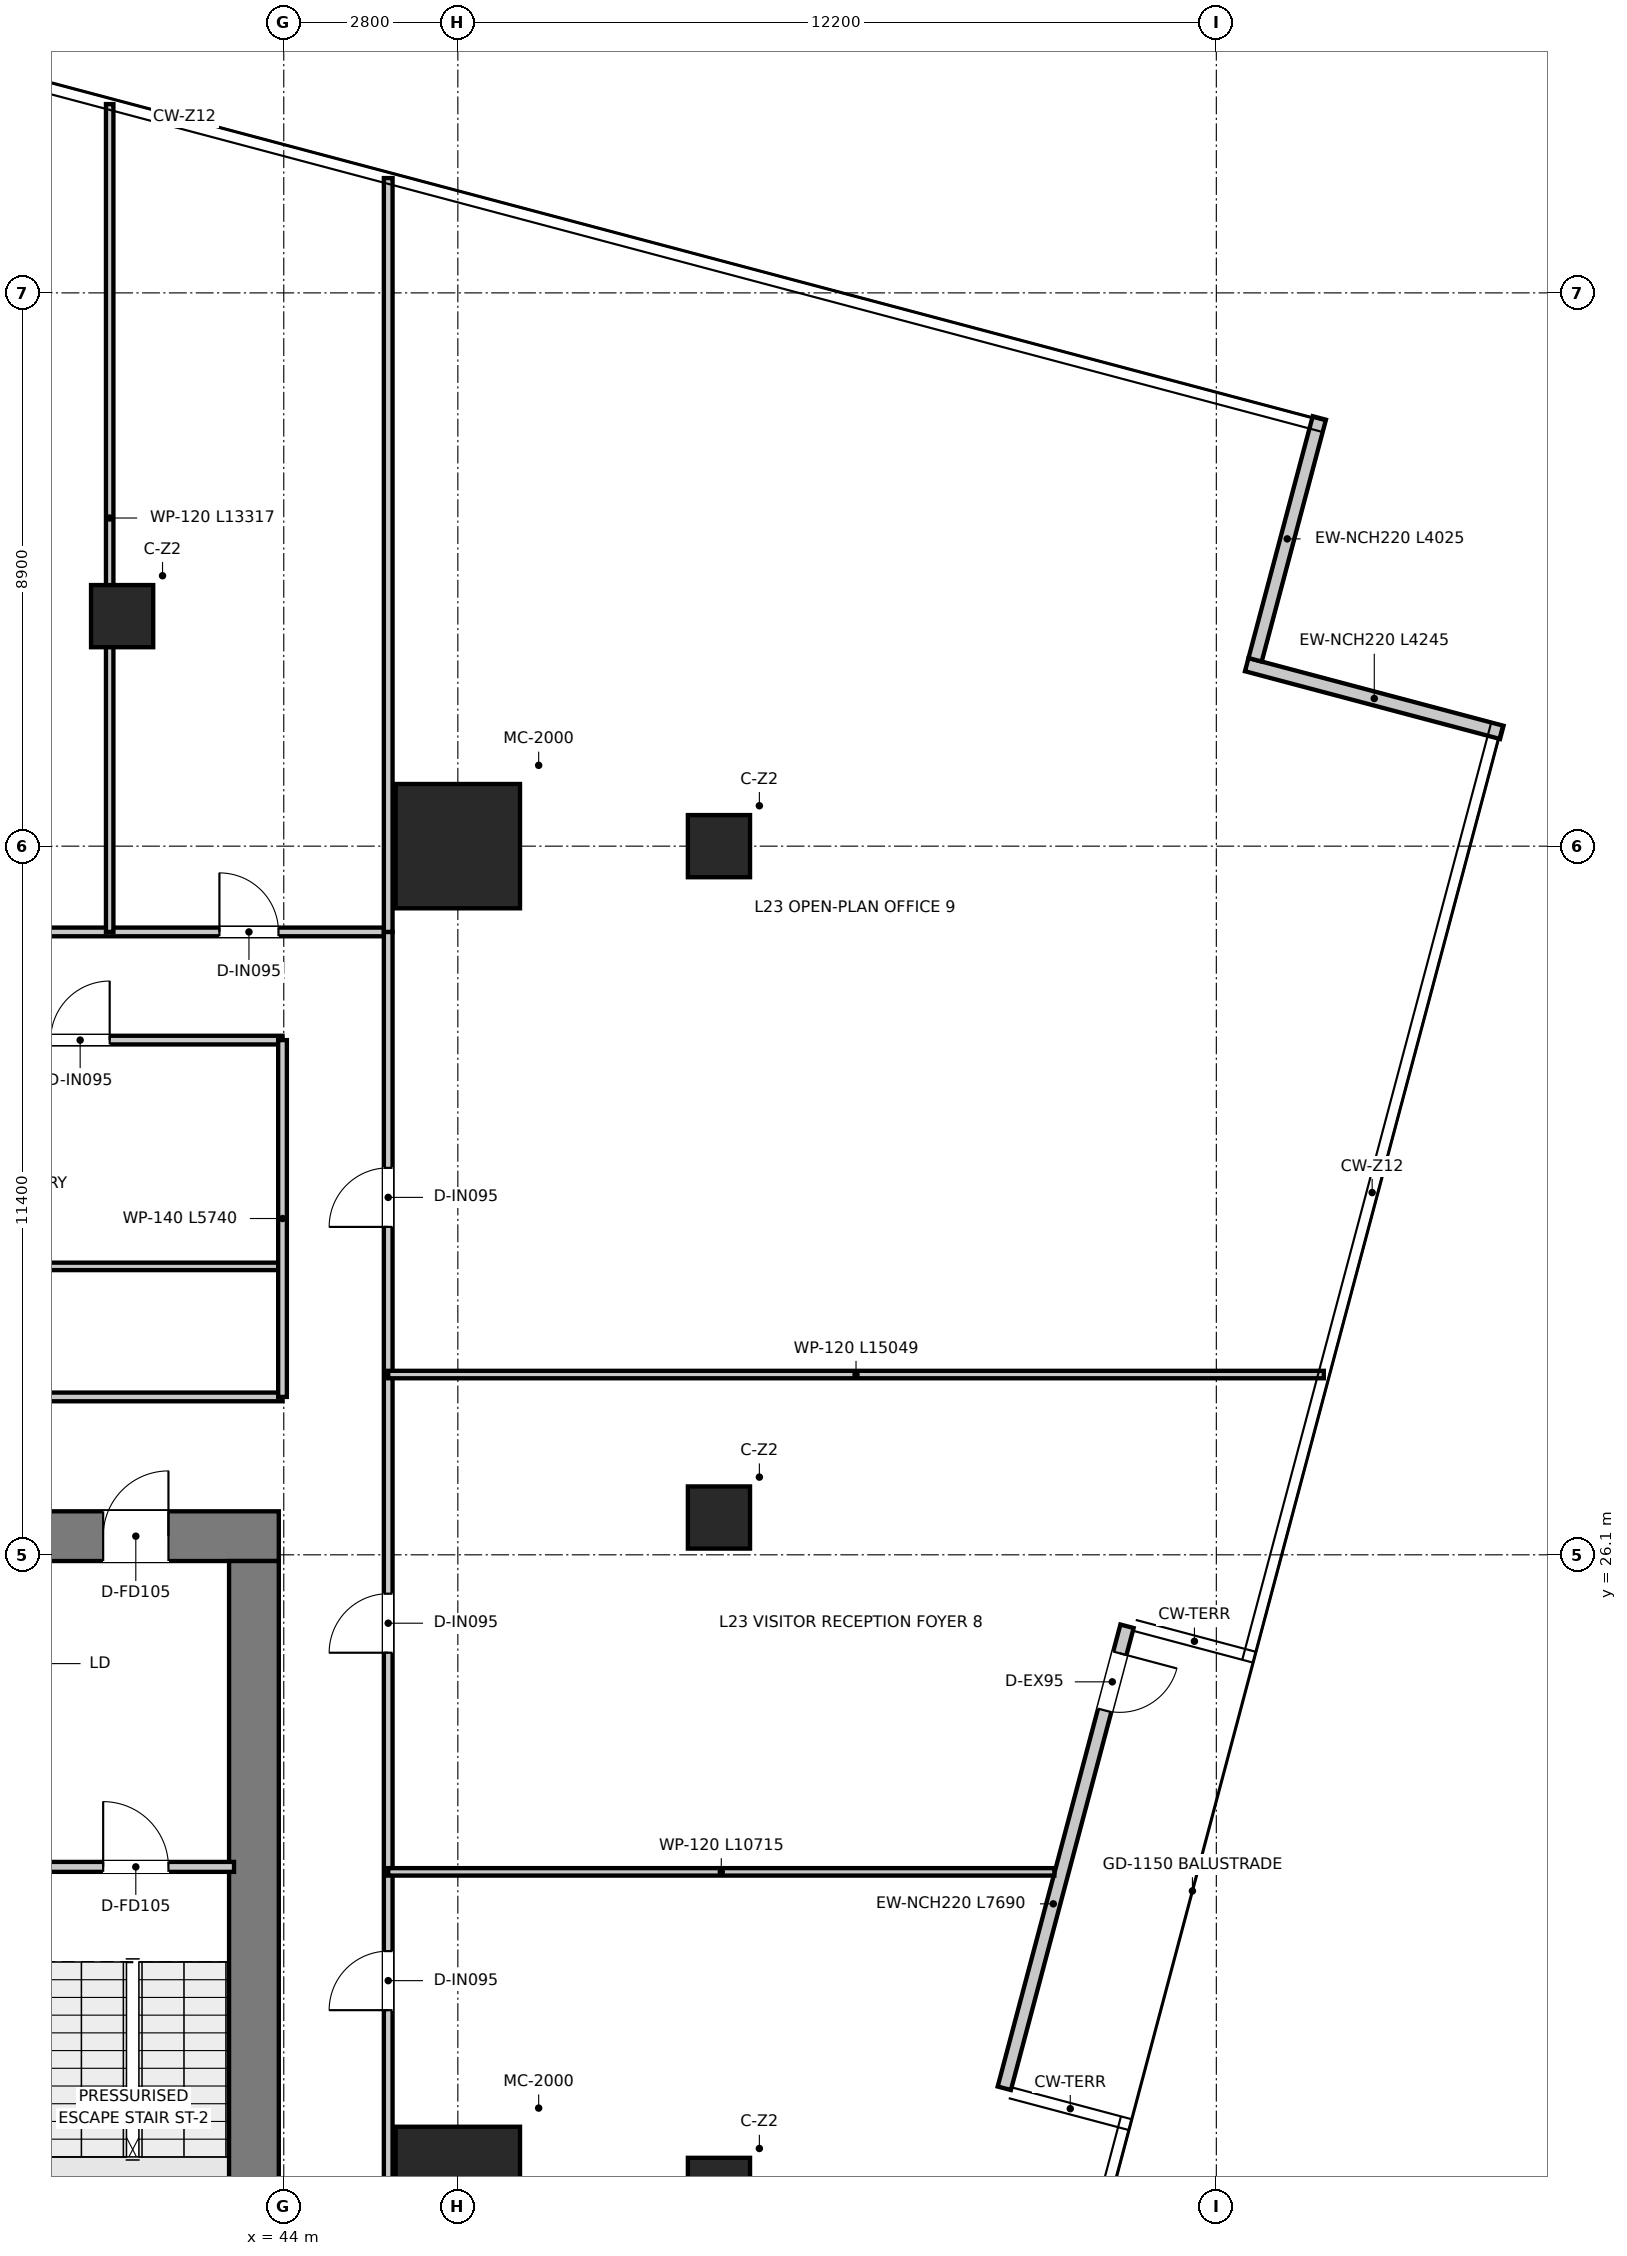
"""IFC4 building model, lengths in metres.
Left out: names, types, materials, properties, quantities, classifications, styles, units other than length and angle.
Written with IfcOpenShell. Run it as: python <this file> out.ifc"""

import sys

from ifc_helpers import new_model, si_unit, direction, frame, frame_2d, origin, origin_2d, place, context, subcontext, project, spatial, rectangle, extrude, source, transform, mapped, element, fill, save


model = new_model("IFC4")
c1 = context("Model", 3, precision=1e-05, world=origin(), true_north=direction((0.0, 1.0)))
c2 = subcontext(c1, "Body", "Model", "MODEL_VIEW")
j1 = project(units=[si_unit("LENGTHUNIT", "METRE"), si_unit("PLANEANGLEUNIT", "RADIAN")], contexts=[c1])
p1 = place(None, origin())
s1 = spatial("IfcSite", under=j1, at=p1, CompositionType="ELEMENT")
p2 = place(p1, origin())
s2 = spatial("IfcBuilding", under=s1, at=p2, CompositionType="ELEMENT")
p3 = place(p2, frame((0.0, 0.0, 97.95)))
s3 = spatial("IfcBuildingStorey", under=s2, at=p3, CompositionType="ELEMENT", Elevation=97.95)
p4 = place(p3, frame((28.08, 26.4, 0.0), z_axis=(0.0, 0.0, 1.0), x_axis=(1.0, 0.0, 0.0)))
e1 = element("IfcWall", 1, at=p4, inside=s3, PredefinedType="SHEAR", context=c2, shape_type="SweptSolid", body=[
    extrude(rectangle(XDim=15.84, YDim=0.8, at=frame_2d((7.92, 0.0))), origin(), (0.0, 0.0, 1.0), 3.95),
])
p5 = place(p4, frame((7.22, 0.0, 0.0)))
e2 = element("IfcOpeningElement", 2, at=p5, cuts=e1, PredefinedType="OPENING", context=c2, shape_type="SweptSolid", body=[
    extrude(rectangle(XDim=1.4, YDim=2.2, at=frame_2d((0.7, 1.1))), frame((0.0, 0.41, 0.0), z_axis=(0.0, -1.0, 0.0), x_axis=(1.0, 0.0, 0.0)), (0.0, 0.0, 1.0), 0.82),
])
p6 = place(p4, frame((1.775, 0.0, 0.0)))
e3 = element("IfcOpeningElement", 3, at=p6, cuts=e1, PredefinedType="OPENING", context=c2, shape_type="SweptSolid", body=[
    extrude(rectangle(XDim=1.05, YDim=2.1, at=frame_2d((0.525, 1.05))), frame((0.0, 0.41, 0.0), z_axis=(0.0, -1.0, 0.0), x_axis=(1.0, 0.0, 0.0)), (0.0, 0.0, 1.0), 0.82),
])
p7 = place(p4, frame((13.015, 0.0, 0.0)))
e4 = element("IfcOpeningElement", 4, at=p7, cuts=e1, PredefinedType="OPENING", context=c2, shape_type="SweptSolid", body=[
    extrude(rectangle(XDim=1.05, YDim=2.1, at=frame_2d((0.525, 1.05))), frame((0.0, 0.41, 0.0), z_axis=(0.0, -1.0, 0.0), x_axis=(1.0, 0.0, 0.0)), (0.0, 0.0, 1.0), 0.82),
])
p8 = place(p3, frame((43.52, 11.3, 0.0), z_axis=(0.0, 0.0, 1.0), x_axis=(0.0, 1.0, 0.0)))
e5 = element("IfcWall", 5, at=p8, inside=s3, PredefinedType="SHEAR", context=c2, shape_type="SweptSolid", body=[
    extrude(rectangle(XDim=14.7, YDim=0.8, at=frame_2d((7.35, 0.0))), origin(), (0.0, 0.0, 1.0), 3.95),
])
m1 = source(origin(), c2, "Body", "SweptSolid", [
    extrude(rectangle(XDim=2.0, YDim=2.0, at=origin_2d()), origin(), (0.0, 0.0, 1.0), 3.95),
])
for number, where, z_axis, x_axis in (
    (6, (46.8, 15.9, 0.0), (0.0, 0.0, 1.0), (1.0, 0.0, 0.0)),
    (7, (46.8, 37.5, 0.0), (0.0, 0.0, 1.0), (1.0, 0.0, 0.0)),
):
    element("IfcColumn", number, at=place(p3, frame(where, z_axis=z_axis, x_axis=x_axis)), inside=s3, PredefinedType="USERDEFINED", context=c2, shape_type="MappedRepresentation", body=[
        mapped(m1, transform((0.0, 0.0, 0.0), x_axis=(1.0, 0.0, 0.0), y_axis=(0.0, 1.0, 0.0), z_axis=(0.0, 0.0, 1.0), scale=1.0)),
    ])
m2 = source(origin(), c2, "Body", "SweptSolid", [
    extrude(rectangle(XDim=1.0, YDim=1.0, at=origin_2d()), origin(), (0.0, 0.0, 1.0), 3.95),
])
for number, where, z_axis, x_axis in (
    (8, (41.4, 41.2, 0.0), (0.0, 0.0, 1.0), (1.0, 0.0, 0.0)),
    (9, (51.0, 37.5, 0.0), (0.0, 0.0, 1.0), (1.0, 0.0, 0.0)),
    (10, (51.0, 26.7, 0.0), (0.0, 0.0, 1.0), (1.0, 0.0, 0.0)),
    (11, (51.0, 15.9, 0.0), (0.0, 0.0, 1.0), (1.0, 0.0, 0.0)),
):
    element("IfcColumn", number, at=place(p3, frame(where, z_axis=z_axis, x_axis=x_axis)), inside=s3, PredefinedType="COLUMN", context=c2, shape_type="MappedRepresentation", body=[
        mapped(m2, transform((0.0, 0.0, 0.0), x_axis=(1.0, 0.0, 0.0), y_axis=(0.0, 1.0, 0.0), z_axis=(0.0, 0.0, 1.0), scale=1.0)),
    ])
p9 = place(p3, frame((57.563, 24.951, 0.0), z_axis=(0.0, 0.0, 1.0), x_axis=(-0.256717978083, -0.966486357756, 0.0)))
e12 = element("IfcWall", 12, at=p9, inside=s3, PredefinedType="ELEMENTEDWALL", context=c2, shape_type="SweptSolid", body=[
    extrude(rectangle(XDim=7.69, YDim=0.22, at=frame_2d((3.845, 0.0))), origin(), (0.0, 0.0, 1.0), 3.67),
])
p10 = place(p9, frame((0.45, 0.0, 0.0)))
e13 = element("IfcOpeningElement", 13, at=p10, cuts=e12, PredefinedType="OPENING", context=c2, shape_type="SweptSolid", body=[
    extrude(rectangle(XDim=0.95, YDim=2.1, at=frame_2d((0.475, 1.05))), frame((0.0, 0.12, 0.0), z_axis=(0.0, -1.0, 0.0), x_axis=(1.0, 0.0, 0.0)), (0.0, 0.0, 1.0), 0.24),
])
p11 = place(p3, frame((63.592, 39.33, 0.0), z_axis=(0.0, 0.0, 1.0), x_axis=(-0.966482674278, 0.256731845164, 0.0)))
e14 = element("IfcWall", 14, at=p11, inside=s3, PredefinedType="ELEMENTEDWALL", context=c2, shape_type="SweptSolid", body=[
    extrude(rectangle(XDim=4.245, YDim=0.22, at=frame_2d((2.123, 0.0))), origin(), (0.0, 0.0, 1.0), 3.67),
])
p12 = place(p3, frame((59.624, 40.498, 0.0), z_axis=(0.0, 0.0, 1.0), x_axis=(0.256696053144, 0.966492181189, 0.0)))
e15 = element("IfcWall", 15, at=p12, inside=s3, PredefinedType="ELEMENTEDWALL", context=c2, shape_type="SweptSolid", body=[
    extrude(rectangle(XDim=4.025, YDim=0.22, at=frame_2d((2.012, 0.0))), origin(), (0.0, 0.0, 1.0), 3.67),
])
p13 = place(p3, frame((40.04, 21.08, 0.0), z_axis=(0.0, 0.0, 1.0), x_axis=(1.0, 0.0, 0.0)))
e16 = element("IfcWall", 16, at=p13, inside=s3, PredefinedType="PARTITIONING", context=c2, shape_type="SweptSolid", body=[
    extrude(rectangle(XDim=3.16, YDim=0.16, at=frame_2d((1.58, 0.0))), origin(), (0.0, 0.0, 1.0), 3.67),
])
p14 = place(p13, frame((1.055, 0.0, 0.0)))
e17 = element("IfcOpeningElement", 17, at=p14, cuts=e16, PredefinedType="OPENING", context=c2, shape_type="SweptSolid", body=[
    extrude(rectangle(XDim=1.05, YDim=2.1, at=frame_2d((0.525, 1.05))), frame((0.0, 0.09, 0.0), z_axis=(0.0, -1.0, 0.0), x_axis=(1.0, 0.0, 0.0)), (0.0, 0.0, 1.0), 0.18),
])
p15 = place(p3, frame((28.02, 28.64, 0.0), z_axis=(0.0, 0.0, 1.0), x_axis=(1.0, 0.0, 0.0)))
e18 = element("IfcWall", 18, at=p15, inside=s3, PredefinedType="PARTITIONING", context=c2, shape_type="SweptSolid", body=[
    extrude(rectangle(XDim=15.96, YDim=0.14, at=frame_2d((7.98, 0.0))), origin(), (0.0, 0.0, 1.0), 3.08),
])
p16 = place(p15, frame((7.455, 0.0, 0.0)))
e19 = element("IfcOpeningElement", 19, at=p16, cuts=e18, PredefinedType="OPENING", context=c2, shape_type="SweptSolid", body=[
    extrude(rectangle(XDim=1.05, YDim=2.15, at=frame_2d((0.525, 1.075))), frame((0.0, 0.08, 0.0), z_axis=(0.0, -1.0, 0.0), x_axis=(1.0, 0.0, 0.0)), (0.0, 0.0, 1.0), 0.16),
])
p17 = place(p3, frame((28.02, 30.74, 0.0), z_axis=(0.0, 0.0, 1.0), x_axis=(1.0, 0.0, 0.0)))
e20 = element("IfcWall", 20, at=p17, inside=s3, PredefinedType="PARTITIONING", context=c2, shape_type="SweptSolid", body=[
    extrude(rectangle(XDim=15.96, YDim=0.12, at=frame_2d((7.98, 0.0))), origin(), (0.0, 0.0, 1.0), 3.08),
])
p18 = place(p3, frame((28.02, 34.38, 0.0), z_axis=(0.0, 0.0, 1.0), x_axis=(1.0, 0.0, 0.0)))
e21 = element("IfcWall", 21, at=p18, inside=s3, PredefinedType="PARTITIONING", context=c2, shape_type="SweptSolid", body=[
    extrude(rectangle(XDim=15.96, YDim=0.14, at=frame_2d((7.98, 0.0))), origin(), (0.0, 0.0, 1.0), 3.08),
])
p19 = place(p18, frame((1.13, 0.0, 0.0)))
e22 = element("IfcOpeningElement", 22, at=p19, cuts=e21, PredefinedType="OPENING", context=c2, shape_type="SweptSolid", body=[
    extrude(rectangle(XDim=0.9, YDim=2.1, at=frame_2d((0.45, 1.05))), frame((0.0, 0.08, 0.0), z_axis=(0.0, -1.0, 0.0), x_axis=(1.0, 0.0, 0.0)), (0.0, 0.0, 1.0), 0.16),
])
p20 = place(p18, frame((4.33, 0.0, 0.0)))
e23 = element("IfcOpeningElement", 23, at=p20, cuts=e21, PredefinedType="OPENING", context=c2, shape_type="SweptSolid", body=[
    extrude(rectangle(XDim=0.9, YDim=2.1, at=frame_2d((0.45, 1.05))), frame((0.0, 0.08, 0.0), z_axis=(0.0, -1.0, 0.0), x_axis=(1.0, 0.0, 0.0)), (0.0, 0.0, 1.0), 0.16),
])
p21 = place(p18, frame((7.355, 0.0, 0.0)))
e24 = element("IfcOpeningElement", 24, at=p21, cuts=e21, PredefinedType="OPENING", context=c2, shape_type="SweptSolid", body=[
    extrude(rectangle(XDim=0.95, YDim=2.1, at=frame_2d((0.475, 1.05))), frame((0.0, 0.08, 0.0), z_axis=(0.0, -1.0, 0.0), x_axis=(1.0, 0.0, 0.0)), (0.0, 0.0, 1.0), 0.16),
])
p22 = place(p18, frame((12.23, 0.0, 0.0)))
e25 = element("IfcOpeningElement", 25, at=p22, cuts=e21, PredefinedType="OPENING", context=c2, shape_type="SweptSolid", body=[
    extrude(rectangle(XDim=0.95, YDim=2.1, at=frame_2d((0.475, 1.05))), frame((0.0, 0.08, 0.0), z_axis=(0.0, -1.0, 0.0), x_axis=(1.0, 0.0, 0.0)), (0.0, 0.0, 1.0), 0.16),
])
p23 = place(p3, frame((43.98, 28.64, 0.0), z_axis=(0.0, 0.0, 1.0), x_axis=(0.0, 1.0, 0.0)))
e26 = element("IfcWall", 26, at=p23, inside=s3, PredefinedType="PARTITIONING", context=c2, shape_type="SweptSolid", body=[
    extrude(rectangle(XDim=5.74, YDim=0.14, at=frame_2d((2.87, 0.0))), origin(), (0.0, 0.0, 1.0), 3.27),
])
p24 = place(p3, frame((26.32, 36.12, 0.0), z_axis=(0.0, 0.0, 1.0), x_axis=(1.0, 0.0, 0.0)))
e27 = element("IfcWall", 27, at=p24, inside=s3, PredefinedType="PARTITIONING", context=c2, shape_type="SweptSolid", body=[
    extrude(rectangle(XDim=19.36, YDim=0.14, at=frame_2d((9.68, 0.0))), origin(), (0.0, 0.0, 1.0), 3.08),
])
p25 = place(p24, frame((1.265, 0.0, 0.0)))
e28 = element("IfcOpeningElement", 28, at=p25, cuts=e27, PredefinedType="OPENING", context=c2, shape_type="SweptSolid", body=[
    extrude(rectangle(XDim=0.95, YDim=2.1, at=frame_2d((0.475, 1.05))), frame((0.0, 0.08, 0.0), z_axis=(0.0, -1.0, 0.0), x_axis=(1.0, 0.0, 0.0)), (0.0, 0.0, 1.0), 0.16),
])
p26 = place(p24, frame((5.855, 0.0, 0.0)))
e29 = element("IfcOpeningElement", 29, at=p26, cuts=e27, PredefinedType="OPENING", context=c2, shape_type="SweptSolid", body=[
    extrude(rectangle(XDim=0.95, YDim=2.1, at=frame_2d((0.475, 1.05))), frame((0.0, 0.08, 0.0), z_axis=(0.0, -1.0, 0.0), x_axis=(1.0, 0.0, 0.0)), (0.0, 0.0, 1.0), 0.16),
])
p27 = place(p24, frame((11.555, 0.0, 0.0)))
e30 = element("IfcOpeningElement", 30, at=p27, cuts=e27, PredefinedType="OPENING", context=c2, shape_type="SweptSolid", body=[
    extrude(rectangle(XDim=0.95, YDim=2.1, at=frame_2d((0.475, 1.05))), frame((0.0, 0.08, 0.0), z_axis=(0.0, -1.0, 0.0), x_axis=(1.0, 0.0, 0.0)), (0.0, 0.0, 1.0), 0.16),
])
p28 = place(p24, frame((16.645, 0.0, 0.0)))
e31 = element("IfcOpeningElement", 31, at=p28, cuts=e27, PredefinedType="OPENING", context=c2, shape_type="SweptSolid", body=[
    extrude(rectangle(XDim=0.95, YDim=2.1, at=frame_2d((0.475, 1.05))), frame((0.0, 0.08, 0.0), z_axis=(0.0, -1.0, 0.0), x_axis=(1.0, 0.0, 0.0)), (0.0, 0.0, 1.0), 0.16),
])
p29 = place(p3, frame((45.68, 10.5, 0.0), z_axis=(0.0, 0.0, 1.0), x_axis=(0.0, 1.0, 0.0)))
e32 = element("IfcWall", 32, at=p29, inside=s3, PredefinedType="PARTITIONING", context=c2, shape_type="SweptSolid", body=[
    extrude(rectangle(XDim=25.62, YDim=0.14, at=frame_2d((12.81, 0.0))), origin(), (0.0, 0.0, 1.0), 2.97),
])
p30 = place(p29, frame((8.275, 0.0, 0.0)))
e33 = element("IfcOpeningElement", 33, at=p30, cuts=e32, PredefinedType="OPENING", context=c2, shape_type="SweptSolid", body=[
    extrude(rectangle(XDim=0.95, YDim=2.1, at=frame_2d((0.475, 1.05))), frame((0.0, 0.08, 0.0), z_axis=(0.0, -1.0, 0.0), x_axis=(1.0, 0.0, 0.0)), (0.0, 0.0, 1.0), 0.16),
])
p31 = place(p29, frame((14.025, 0.0, 0.0)))
e34 = element("IfcOpeningElement", 34, at=p31, cuts=e32, PredefinedType="OPENING", context=c2, shape_type="SweptSolid", body=[
    extrude(rectangle(XDim=0.95, YDim=2.1, at=frame_2d((0.475, 1.05))), frame((0.0, 0.08, 0.0), z_axis=(0.0, -1.0, 0.0), x_axis=(1.0, 0.0, 0.0)), (0.0, 0.0, 1.0), 0.16),
])
p32 = place(p29, frame((20.875, 0.0, 0.0)))
e35 = element("IfcOpeningElement", 35, at=p32, cuts=e32, PredefinedType="OPENING", context=c2, shape_type="SweptSolid", body=[
    extrude(rectangle(XDim=0.95, YDim=2.1, at=frame_2d((0.475, 1.05))), frame((0.0, 0.08, 0.0), z_axis=(0.0, -1.0, 0.0), x_axis=(1.0, 0.0, 0.0)), (0.0, 0.0, 1.0), 0.16),
])
p33 = place(p3, frame((45.68, 36.12, 0.0), z_axis=(0.0, 0.0, 1.0), x_axis=(0.0, 1.0, 0.0)))
e36 = element("IfcWall", 36, at=p33, inside=s3, PredefinedType="PARTITIONING", context=c2, shape_type="SweptSolid", body=[
    extrude(rectangle(XDim=12.127, YDim=0.14, at=frame_2d((6.063, 0.0))), origin(), (0.0, 0.0, 1.0), 2.97),
])
p34 = place(p3, frame((41.2, 36.12, 0.0), z_axis=(0.0, 0.0, 1.0), x_axis=(0.0, 1.0, 0.0)))
e37 = element("IfcWall", 37, at=p34, inside=s3, PredefinedType="PARTITIONING", context=c2, shape_type="SweptSolid", body=[
    extrude(rectangle(XDim=13.317, YDim=0.12, at=frame_2d((6.658, 0.0))), origin(), (0.0, 0.0, 1.0), 2.97),
])
p35 = place(p3, frame((45.68, 21.0, 0.0), z_axis=(0.0, 0.0, 1.0), x_axis=(1.0, 0.0, 0.0)))
e38 = element("IfcWall", 38, at=p35, inside=s3, PredefinedType="PARTITIONING", context=c2, shape_type="SweptSolid", body=[
    extrude(rectangle(XDim=10.715, YDim=0.12, at=frame_2d((5.358, 0.0))), origin(), (0.0, 0.0, 1.0), 2.97),
])
p36 = place(p3, frame((45.68, 29.0, 0.0), z_axis=(0.0, 0.0, 1.0), x_axis=(1.0, 0.0, 0.0)))
e39 = element("IfcWall", 39, at=p36, inside=s3, PredefinedType="PARTITIONING", context=c2, shape_type="SweptSolid", body=[
    extrude(rectangle(XDim=15.049, YDim=0.12, at=frame_2d((7.525, 0.0))), origin(), (0.0, 0.0, 1.0), 2.97),
])
p37 = place(p14, origin())
e40 = element("IfcDoor", 40, at=p37, inside=s3, OperationType="SINGLE_SWING_LEFT", PredefinedType="DOOR", context=c2, shape_type="SweptSolid", body=[
    extrude(rectangle(XDim=1.05, YDim=2.1, at=frame_2d((0.525, 1.05))), frame((0.0, 0.025, 0.0), z_axis=(0.0, -1.0, 0.0), x_axis=(1.0, 0.0, 0.0)), (0.0, 0.0, 1.0), 0.05),
])
fill(e17, e40)
p38 = place(p7, origin())
e41 = element("IfcDoor", 41, at=p38, inside=s3, OperationType="SINGLE_SWING_RIGHT", PredefinedType="DOOR", context=c2, shape_type="SweptSolid", body=[
    extrude(rectangle(XDim=1.05, YDim=2.1, at=frame_2d((0.525, 1.05))), frame((0.0, 0.025, 0.0), z_axis=(0.0, -1.0, 0.0), x_axis=(1.0, 0.0, 0.0)), (0.0, 0.0, 1.0), 0.05),
])
fill(e4, e41)
p39 = place(p22, origin())
e42 = element("IfcDoor", 42, at=p39, inside=s3, OperationType="SINGLE_SWING_RIGHT", PredefinedType="DOOR", context=c2, shape_type="SweptSolid", body=[
    extrude(rectangle(XDim=0.95, YDim=2.1, at=frame_2d((0.475, 1.05))), frame((0.0, 0.025, 0.0), z_axis=(0.0, -1.0, 0.0), x_axis=(1.0, 0.0, 0.0)), (0.0, 0.0, 1.0), 0.05),
])
fill(e25, e42)
p40 = place(p28, origin())
e43 = element("IfcDoor", 43, at=p40, inside=s3, OperationType="SINGLE_SWING_LEFT", PredefinedType="DOOR", context=c2, shape_type="SweptSolid", body=[
    extrude(rectangle(XDim=0.95, YDim=2.1, at=frame_2d((0.475, 1.05))), frame((0.0, 0.025, 0.0), z_axis=(0.0, -1.0, 0.0), x_axis=(1.0, 0.0, 0.0)), (0.0, 0.0, 1.0), 0.05),
])
fill(e31, e43)
p41 = place(p30, origin())
e44 = element("IfcDoor", 44, at=p41, inside=s3, OperationType="SINGLE_SWING_LEFT", PredefinedType="DOOR", context=c2, shape_type="SweptSolid", body=[
    extrude(rectangle(XDim=0.95, YDim=2.1, at=frame_2d((0.475, 1.05))), frame((0.0, 0.025, 0.0), z_axis=(0.0, -1.0, 0.0), x_axis=(1.0, 0.0, 0.0)), (0.0, 0.0, 1.0), 0.05),
])
fill(e33, e44)
p42 = place(p31, origin())
e45 = element("IfcDoor", 45, at=p42, inside=s3, OperationType="SINGLE_SWING_LEFT", PredefinedType="DOOR", context=c2, shape_type="SweptSolid", body=[
    extrude(rectangle(XDim=0.95, YDim=2.1, at=frame_2d((0.475, 1.05))), frame((0.0, 0.025, 0.0), z_axis=(0.0, -1.0, 0.0), x_axis=(1.0, 0.0, 0.0)), (0.0, 0.0, 1.0), 0.05),
])
fill(e34, e45)
p43 = place(p32, origin())
e46 = element("IfcDoor", 46, at=p43, inside=s3, OperationType="SINGLE_SWING_LEFT", PredefinedType="DOOR", context=c2, shape_type="SweptSolid", body=[
    extrude(rectangle(XDim=0.95, YDim=2.1, at=frame_2d((0.475, 1.05))), frame((0.0, 0.025, 0.0), z_axis=(0.0, -1.0, 0.0), x_axis=(1.0, 0.0, 0.0)), (0.0, 0.0, 1.0), 0.05),
])
fill(e35, e46)
p44 = place(p10, origin())
e47 = element("IfcDoor", 47, at=p44, inside=s3, OperationType="SINGLE_SWING_LEFT", PredefinedType="DOOR", context=c2, shape_type="SweptSolid", body=[
    extrude(rectangle(XDim=0.95, YDim=2.1, at=frame_2d((0.475, 1.05))), frame((0.0, 0.025, 0.0), z_axis=(0.0, -1.0, 0.0), x_axis=(1.0, 0.0, 0.0)), (0.0, 0.0, 1.0), 0.05),
])
fill(e13, e47)
save(model, sys.argv[1])
